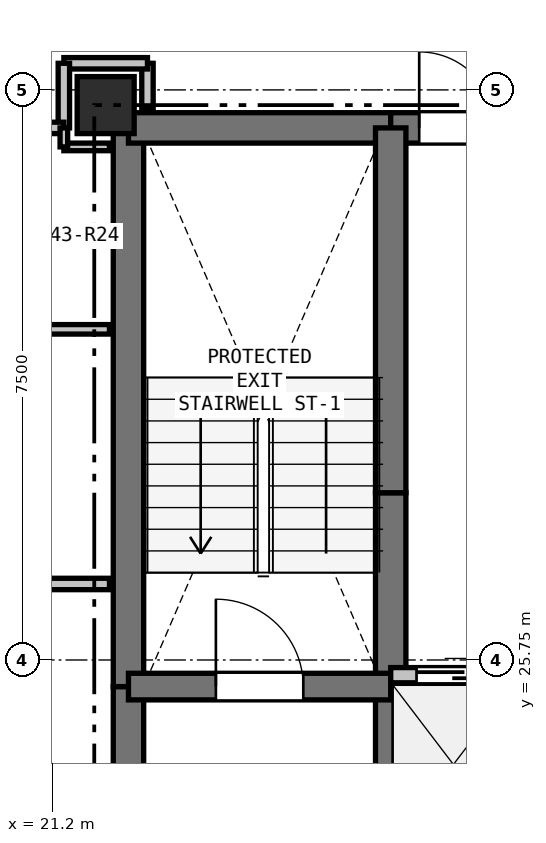
"""IFC4 building model, lengths in metres.
Left out: names, types, materials, properties, quantities, classifications, styles, units other than length and angle.
Written with IfcOpenShell. Run it as: python <this file> out.ifc"""

import sys

from ifc_helpers import new_model, si_unit, direction, frame, frame_2d, origin, origin_2d, place, context, subcontext, project, spatial, rectangle, extrude, element, fill, save


model = new_model("IFC4")
c1 = context("Model", 3, precision=1e-05, world=origin(), true_north=direction((0.0, 1.0)))
c2 = subcontext(c1, "Body", "Model", "MODEL_VIEW")
j1 = project(units=[si_unit("LENGTHUNIT", "METRE"), si_unit("PLANEANGLEUNIT", "RADIAN")], contexts=[c1])
p1 = place(None, origin())
s1 = spatial("IfcSite", under=j1, at=p1, CompositionType="ELEMENT")
p2 = place(p1, origin())
s2 = spatial("IfcBuilding", under=s1, at=p2, CompositionType="ELEMENT")
p3 = place(p2, frame((0.0, 0.0, 154.2)))
s3 = spatial("IfcBuildingStorey", under=s2, at=p3, CompositionType="ELEMENT", Elevation=154.2)
p4 = place(p3, frame((21.9, 33.05, 0.0), z_axis=(0.0, 0.0, 1.0), x_axis=(1.0, 0.0, 0.0)))
e1 = element("IfcColumn", 1, at=p4, inside=s3, PredefinedType="COLUMN", context=c2, shape_type="SweptSolid", body=[
    extrude(rectangle(XDim=0.75, YDim=0.75, at=origin_2d()), origin(), (0.0, 0.0, 1.0), 3.3),
])
p5 = place(p3, frame((22.2, 20.75, 0.0), z_axis=(0.0, 0.0, 1.0), x_axis=(0.0, 1.0, 0.0)))
e2 = element("IfcWall", 2, at=p5, inside=s3, PredefinedType="SHEAR", context=c2, shape_type="SweptSolid", body=[
    extrude(rectangle(XDim=4.65, YDim=0.4, at=frame_2d((2.325, 0.0))), origin(), (0.0, 0.0, 1.0), 3.06),
])
p6 = place(p3, frame((22.2, 25.4, 0.0), z_axis=(0.0, 0.0, 1.0), x_axis=(0.0, 1.0, 0.0)))
e3 = element("IfcWall", 3, at=p6, inside=s3, PredefinedType="SHEAR", context=c2, shape_type="SweptSolid", body=[
    extrude(rectangle(XDim=7.35, YDim=0.4, at=frame_2d((3.675, 0.0))), origin(), (0.0, 0.0, 1.0), 3.06),
])
p7 = place(p3, frame((22.2, 32.75, 0.0), z_axis=(0.0, 0.0, 1.0), x_axis=(1.0, 0.0, 0.0)))
e4 = element("IfcWall", 4, at=p7, inside=s3, PredefinedType="SHEAR", context=c2, shape_type="SweptSolid", body=[
    extrude(rectangle(XDim=3.45, YDim=0.4, at=frame_2d((1.725, 0.0))), origin(), (0.0, 0.0, 1.0), 3.06),
])
p8 = place(p3, frame((25.65, 32.75, 0.0), z_axis=(0.0, 0.0, 1.0), x_axis=(1.0, 0.0, 0.0)))
e5 = element("IfcWall", 5, at=p8, inside=s3, PredefinedType="SHEAR", context=c2, shape_type="SweptSolid", body=[
    extrude(rectangle(XDim=1.75, YDim=0.4, at=frame_2d((0.875, 0.0))), origin(), (0.0, 0.0, 1.0), 3.06),
])
p9 = place(p8, frame((0.375, 0.0, 0.0)))
e6 = element("IfcOpeningElement", 6, at=p9, cuts=e5, PredefinedType="OPENING", context=c2, shape_type="SweptSolid", body=[
    extrude(rectangle(XDim=1.0, YDim=2.15, at=frame_2d((0.5, 1.075))), frame((0.0, 0.21, 0.0), z_axis=(0.0, -1.0, 0.0), x_axis=(1.0, 0.0, 0.0)), (0.0, 0.0, 1.0), 0.42),
])
p10 = place(p3, frame((25.65, 22.75, 0.0), z_axis=(0.0, 0.0, 1.0), x_axis=(0.0, 1.0, 0.0)))
e7 = element("IfcWall", 7, at=p10, inside=s3, PredefinedType="SHEAR", context=c2, shape_type="SweptSolid", body=[
    extrude(rectangle(XDim=2.8, YDim=0.4, at=frame_2d((1.4, 0.0))), origin(), (0.0, 0.0, 1.0), 3.06),
])
p11 = place(p3, frame((25.65, 25.55, 0.0), z_axis=(0.0, 0.0, 1.0), x_axis=(0.0, 1.0, 0.0)))
e8 = element("IfcWall", 8, at=p11, inside=s3, PredefinedType="SHEAR", context=c2, shape_type="SweptSolid", body=[
    extrude(rectangle(XDim=2.4, YDim=0.4, at=frame_2d((1.2, 0.0))), origin(), (0.0, 0.0, 1.0), 3.06),
])
p12 = place(p3, frame((25.65, 27.95, 0.0), z_axis=(0.0, 0.0, 1.0), x_axis=(0.0, 1.0, 0.0)))
e9 = element("IfcWall", 9, at=p12, inside=s3, PredefinedType="SHEAR", context=c2, shape_type="SweptSolid", body=[
    extrude(rectangle(XDim=4.8, YDim=0.4, at=frame_2d((2.4, 0.0))), origin(), (0.0, 0.0, 1.0), 3.06),
])
p13 = place(p3, frame((22.2, 25.4, 0.0), z_axis=(0.0, 0.0, 1.0), x_axis=(1.0, 0.0, 0.0)))
e10 = element("IfcWall", 10, at=p13, inside=s3, PredefinedType="SHEAR", context=c2, shape_type="SweptSolid", body=[
    extrude(rectangle(XDim=3.45, YDim=0.35, at=frame_2d((1.725, 0.0))), origin(), (0.0, 0.0, 1.0), 3.06),
])
p14 = place(p13, frame((1.15, 0.0, 0.0)))
e11 = element("IfcOpeningElement", 11, at=p14, cuts=e10, PredefinedType="OPENING", context=c2, shape_type="SweptSolid", body=[
    extrude(rectangle(XDim=1.15, YDim=2.15, at=frame_2d((0.575, 1.075))), frame((0.0, 0.185, 0.0), z_axis=(0.0, -1.0, 0.0), x_axis=(1.0, 0.0, 0.0)), (0.0, 0.0, 1.0), 0.37),
])
p15 = place(p3, frame((25.65, 25.55, 0.0), z_axis=(0.0, 0.0, 1.0), x_axis=(1.0, 0.0, 0.0)))
e12 = element("IfcWall", 12, at=p15, inside=s3, PredefinedType="PARTITIONING", context=c2, shape_type="SweptSolid", body=[
    extrude(rectangle(XDim=4.95, YDim=0.2, at=frame_2d((2.475, 0.0))), origin(), (0.0, 0.0, 1.0), 3.06),
])
p16 = place(p15, frame((0.34, 0.0, 0.0)))
e13 = element("IfcOpeningElement", 13, at=p16, cuts=e12, PredefinedType="OPENING", context=c2, shape_type="SweptSolid", body=[
    extrude(rectangle(XDim=1.1, YDim=2.15, at=frame_2d((0.55, 1.075))), frame((0.0, 0.11, 0.0), z_axis=(0.0, -1.0, 0.0), x_axis=(1.0, 0.0, 0.0)), (0.0, 0.0, 1.0), 0.22),
])
p17 = place(p15, frame((1.99, 0.0, 0.0)))
e14 = element("IfcOpeningElement", 14, at=p17, cuts=e12, PredefinedType="OPENING", context=c2, shape_type="SweptSolid", body=[
    extrude(rectangle(XDim=1.1, YDim=2.15, at=frame_2d((0.55, 1.075))), frame((0.0, 0.11, 0.0), z_axis=(0.0, -1.0, 0.0), x_axis=(1.0, 0.0, 0.0)), (0.0, 0.0, 1.0), 0.22),
])
p18 = place(p15, frame((3.64, 0.0, 0.0)))
e15 = element("IfcOpeningElement", 15, at=p18, cuts=e12, PredefinedType="OPENING", context=c2, shape_type="SweptSolid", body=[
    extrude(rectangle(XDim=1.1, YDim=2.15, at=frame_2d((0.55, 1.075))), frame((0.0, 0.11, 0.0), z_axis=(0.0, -1.0, 0.0), x_axis=(1.0, 0.0, 0.0)), (0.0, 0.0, 1.0), 0.22),
])
p19 = place(p3, frame((22.45, 33.0, 0.0), z_axis=(0.0, 0.0, 1.0), x_axis=(0.0, 1.0, 0.0)))
e16 = element("IfcWall", 16, at=p19, inside=s3, PredefinedType="PARTITIONING", context=c2, shape_type="SweptSolid", body=[
    extrude(rectangle(XDim=0.6, YDim=0.15, at=frame_2d((0.3, 0.0))), origin(), (0.0, 0.0, 1.0), 2.585),
])
p20 = place(p3, frame((22.45, 33.6, 0.0), z_axis=(0.0, 0.0, 1.0), x_axis=(-1.0, 0.0, 0.0)))
e17 = element("IfcWall", 17, at=p20, inside=s3, PredefinedType="PARTITIONING", context=c2, shape_type="SweptSolid", body=[
    extrude(rectangle(XDim=1.1, YDim=0.15, at=frame_2d((0.55, 0.0))), origin(), (0.0, 0.0, 1.0), 3.06),
])
p21 = place(p3, frame((21.35, 33.6, 0.0), z_axis=(0.0, 0.0, 1.0), x_axis=(0.0, -1.0, 0.0)))
e18 = element("IfcWall", 18, at=p21, inside=s3, PredefinedType="PARTITIONING", context=c2, shape_type="SweptSolid", body=[
    extrude(rectangle(XDim=0.85, YDim=0.15, at=frame_2d((0.425, 0.0))), origin(), (0.0, 0.0, 1.0), 2.433),
])
p22 = place(p3, frame((21.35, 32.75, 0.0), z_axis=(0.0, 0.0, 1.0), x_axis=(-1.0, 0.0, 0.0)))
e19 = element("IfcWall", 19, at=p22, inside=s3, PredefinedType="PARTITIONING", context=c2, shape_type="SweptSolid", body=[
    extrude(rectangle(XDim=1.35, YDim=0.15, at=frame_2d((0.675, 0.0))), origin(), (0.0, 0.0, 1.0), 2.433),
])
p23 = place(p22, frame((0.175, 0.0, 0.0)))
e20 = element("IfcOpeningElement", 20, at=p23, cuts=e19, PredefinedType="OPENING", context=c2, shape_type="SweptSolid", body=[
    extrude(rectangle(XDim=1.0, YDim=2.15, at=frame_2d((0.5, 1.075))), frame((0.0, 0.085, 0.0), z_axis=(0.0, -1.0, 0.0), x_axis=(1.0, 0.0, 0.0)), (0.0, 0.0, 1.0), 0.17),
])
p24 = place(p3, frame((21.35, 32.5, 0.0), z_axis=(0.0, 0.0, 1.0), x_axis=(1.0, 0.0, 0.0)))
e21 = element("IfcWall", 21, at=p24, inside=s3, PredefinedType="PARTITIONING", context=c2, shape_type="SweptSolid", body=[
    extrude(rectangle(XDim=0.6, YDim=0.1, at=frame_2d((0.3, 0.0))), origin(), (0.0, 0.0, 1.0), 2.585),
])
p25 = place(p3, frame((21.95, 30.1, 0.0), z_axis=(0.0, 0.0, 1.0), x_axis=(-1.0, 0.0, 0.0)))
e22 = element("IfcWall", 22, at=p25, inside=s3, PredefinedType="PARTITIONING", context=c2, shape_type="SweptSolid", body=[
    extrude(rectangle(XDim=2.75, YDim=0.125, at=frame_2d((1.375, 0.0))), origin(), (0.0, 0.0, 1.0), 2.585),
])
p26 = place(p25, frame((0.9, 0.0, 0.0)))
e23 = element("IfcOpeningElement", 23, at=p26, cuts=e22, PredefinedType="OPENING", context=c2, shape_type="SweptSolid", body=[
    extrude(rectangle(XDim=0.95, YDim=2.1, at=frame_2d((0.475, 1.05))), frame((0.0, 0.073, 0.0), z_axis=(0.0, -1.0, 0.0), x_axis=(1.0, 0.0, 0.0)), (0.0, 0.0, 1.0), 0.145),
])
p27 = place(p3, frame((21.35, 32.75, 0.0), z_axis=(0.0, 0.0, 1.0), x_axis=(0.0, -1.0, 0.0)))
e24 = element("IfcWall", 24, at=p27, inside=s3, PredefinedType="PARTITIONING", context=c2, shape_type="SweptSolid", body=[
    extrude(rectangle(XDim=0.25, YDim=0.1, at=frame_2d((0.125, 0.0))), origin(), (0.0, 0.0, 1.0), 3.06),
])
p28 = place(p3, frame((6.709, 26.75, 0.0), z_axis=(0.0, 0.0, 1.0), x_axis=(1.0, 0.0, 0.0)))
e25 = element("IfcWall", 25, at=p28, inside=s3, PredefinedType="PARTITIONING", context=c2, shape_type="SweptSolid", body=[
    extrude(rectangle(XDim=15.241, YDim=0.15, at=frame_2d((7.62, 0.0))), origin(), (0.0, 0.0, 1.0), 2.585),
])
p29 = place(p16, origin())
e26 = element("IfcDoor", 26, at=p29, inside=s3, OperationType="SLIDING_TO_LEFT", PredefinedType="DOOR", context=c2, shape_type="SweptSolid", body=[
    extrude(rectangle(XDim=1.1, YDim=2.15, at=frame_2d((0.55, 1.075))), frame((0.0, 0.025, 0.0), z_axis=(0.0, -1.0, 0.0), x_axis=(1.0, 0.0, 0.0)), (0.0, 0.0, 1.0), 0.05),
])
fill(e13, e26)
p30 = place(p9, origin())
e27 = element("IfcDoor", 27, at=p30, inside=s3, OperationType="SINGLE_SWING_LEFT", PredefinedType="DOOR", context=c2, shape_type="SweptSolid", body=[
    extrude(rectangle(XDim=1.0, YDim=2.15, at=frame_2d((0.5, 1.075))), frame((0.0, 0.025, 0.0), z_axis=(0.0, -1.0, 0.0), x_axis=(1.0, 0.0, 0.0)), (0.0, 0.0, 1.0), 0.05),
])
fill(e6, e27)
p31 = place(p14, origin())
e28 = element("IfcDoor", 28, at=p31, inside=s3, OperationType="SINGLE_SWING_LEFT", PredefinedType="DOOR", context=c2, shape_type="SweptSolid", body=[
    extrude(rectangle(XDim=1.15, YDim=2.15, at=frame_2d((0.575, 1.075))), frame((0.0, 0.025, 0.0), z_axis=(0.0, -1.0, 0.0), x_axis=(1.0, 0.0, 0.0)), (0.0, 0.0, 1.0), 0.05),
])
fill(e11, e28)
save(model, sys.argv[1])
